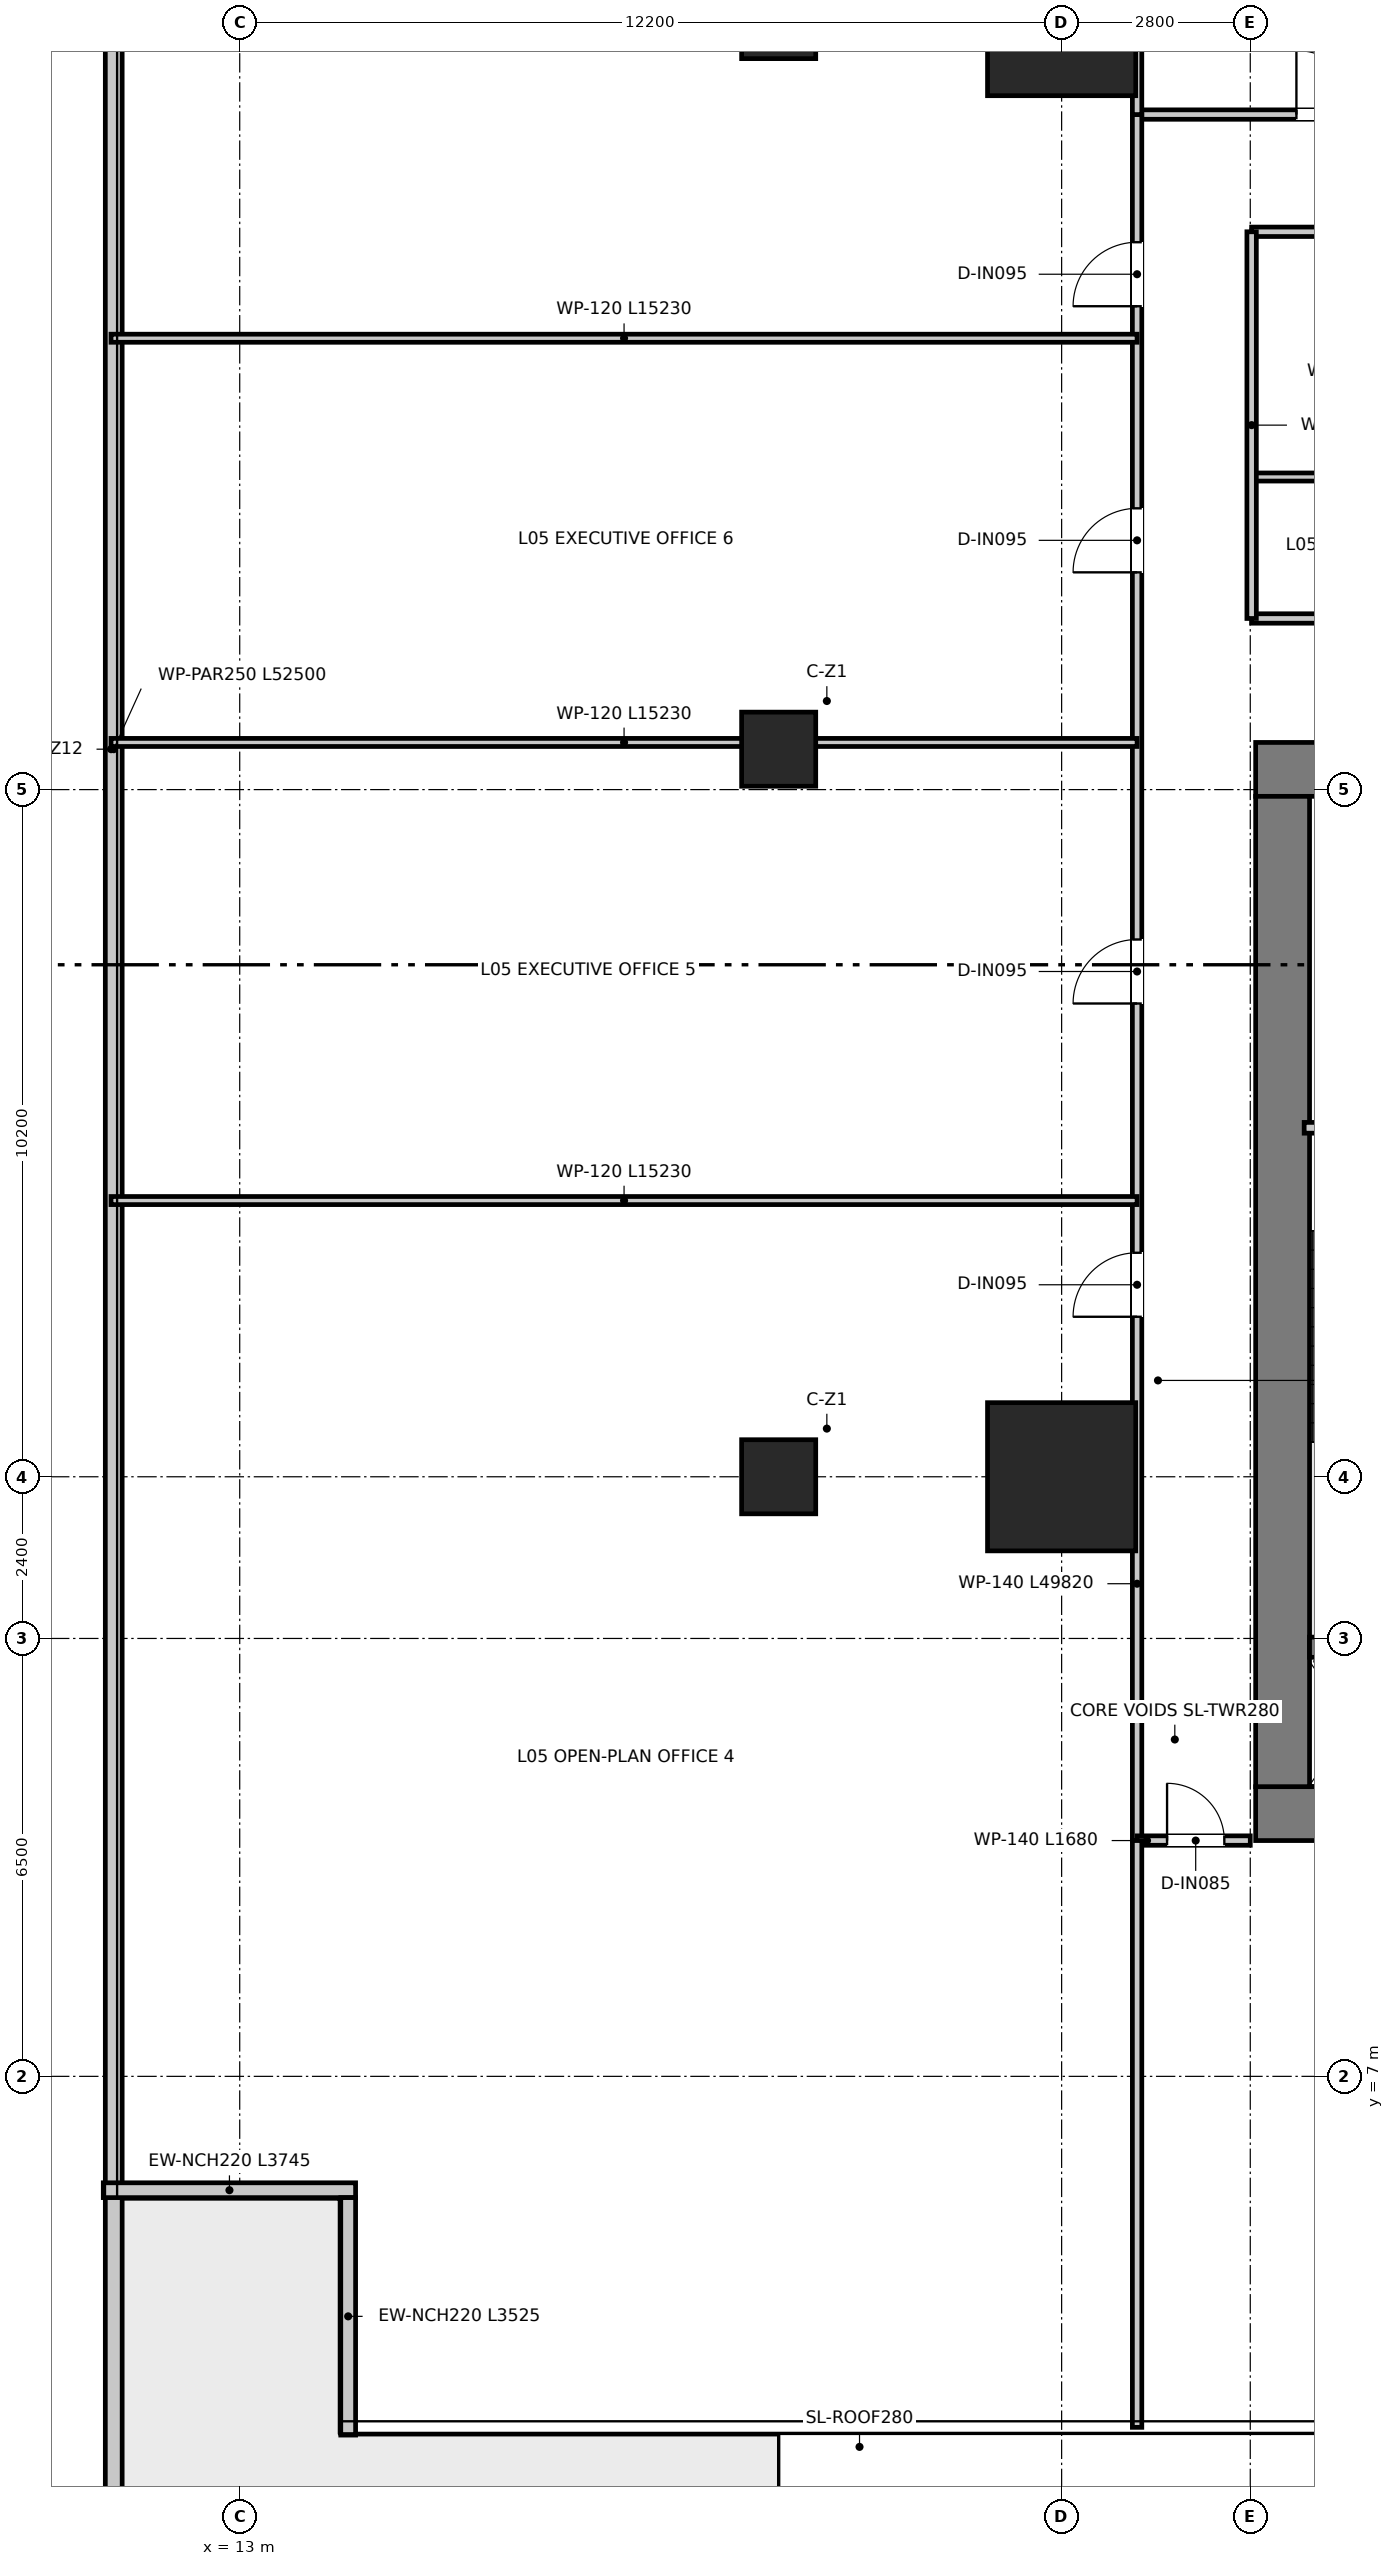
"""IFC4 building model, lengths in metres.
Left out: names, types, materials, properties, quantities, classifications, styles, units other than length and angle.
Written with IfcOpenShell. Run it as: python <this file> out.ifc"""

import sys

from ifc_helpers import new_model, si_unit, direction, frame, frame_2d, origin, origin_2d, place, context, subcontext, project, spatial, rectangle, extrude, source, transform, mapped, element, fill, save


model = new_model("IFC4")
c1 = context("Model", 3, precision=1e-05, world=origin(), true_north=direction((0.0, 1.0)))
c2 = subcontext(c1, "Body", "Model", "MODEL_VIEW")
j1 = project(units=[si_unit("LENGTHUNIT", "METRE"), si_unit("PLANEANGLEUNIT", "RADIAN")], contexts=[c1])
p1 = place(None, origin())
s1 = spatial("IfcSite", under=j1, at=p1, CompositionType="ELEMENT")
p2 = place(p1, origin())
s2 = spatial("IfcBuilding", under=s1, at=p2, CompositionType="ELEMENT")
p3 = place(p2, frame((0.0, 0.0, 25.0)))
s3 = spatial("IfcBuildingStorey", under=s2, at=p3, CompositionType="ELEMENT", Elevation=25.0)
p4 = place(p3, frame((28.08, 10.9, 0.0), z_axis=(0.0, 0.0, 1.0), x_axis=(1.0, 0.0, 0.0)))
e1 = element("IfcWall", 1, at=p4, inside=s3, PredefinedType="SHEAR", context=c2, shape_type="SweptSolid", body=[
    extrude(rectangle(XDim=15.84, YDim=0.8, at=frame_2d((7.92, 0.0))), origin(), (0.0, 0.0, 1.0), 3.95),
])
p5 = place(p3, frame((28.08, 26.4, 0.0), z_axis=(0.0, 0.0, 1.0), x_axis=(1.0, 0.0, 0.0)))
e2 = element("IfcWall", 2, at=p5, inside=s3, PredefinedType="SHEAR", context=c2, shape_type="SweptSolid", body=[
    extrude(rectangle(XDim=15.84, YDim=0.8, at=frame_2d((7.92, 0.0))), origin(), (0.0, 0.0, 1.0), 3.95),
])
p6 = place(p5, frame((7.22, 0.0, 0.0)))
e3 = element("IfcOpeningElement", 3, at=p6, cuts=e2, PredefinedType="OPENING", context=c2, shape_type="SweptSolid", body=[
    extrude(rectangle(XDim=1.4, YDim=2.2, at=frame_2d((0.7, 1.1))), frame((0.0, 0.41, 0.0), z_axis=(0.0, -1.0, 0.0), x_axis=(1.0, 0.0, 0.0)), (0.0, 0.0, 1.0), 0.82),
])
p7 = place(p5, frame((1.775, 0.0, 0.0)))
e4 = element("IfcOpeningElement", 4, at=p7, cuts=e2, PredefinedType="OPENING", context=c2, shape_type="SweptSolid", body=[
    extrude(rectangle(XDim=1.05, YDim=2.1, at=frame_2d((0.525, 1.05))), frame((0.0, 0.41, 0.0), z_axis=(0.0, -1.0, 0.0), x_axis=(1.0, 0.0, 0.0)), (0.0, 0.0, 1.0), 0.82),
])
p8 = place(p5, frame((13.015, 0.0, 0.0)))
e5 = element("IfcOpeningElement", 5, at=p8, cuts=e2, PredefinedType="OPENING", context=c2, shape_type="SweptSolid", body=[
    extrude(rectangle(XDim=1.05, YDim=2.1, at=frame_2d((0.525, 1.05))), frame((0.0, 0.41, 0.0), z_axis=(0.0, -1.0, 0.0), x_axis=(1.0, 0.0, 0.0)), (0.0, 0.0, 1.0), 0.82),
])
p9 = place(p3, frame((28.48, 11.3, 0.0), z_axis=(0.0, 0.0, 1.0), x_axis=(0.0, 1.0, 0.0)))
e6 = element("IfcWall", 6, at=p9, inside=s3, PredefinedType="SHEAR", context=c2, shape_type="SweptSolid", body=[
    extrude(rectangle(XDim=14.7, YDim=0.8, at=frame_2d((7.35, 0.0))), origin(), (0.0, 0.0, 1.0), 3.95),
])
p10 = place(p3, frame((28.88, 13.37, 0.0), z_axis=(0.0, 0.0, 1.0), x_axis=(1.0, 0.0, 0.0)))
e7 = element("IfcWall", 7, at=p10, inside=s3, PredefinedType="SHEAR", context=c2, shape_type="SweptSolid", body=[
    extrude(rectangle(XDim=3.1, YDim=0.3, at=frame_2d((1.55, 0.0))), origin(), (0.0, 0.0, 1.0), 3.95),
])
m1 = source(origin(), c2, "Body", "SweptSolid", [
    extrude(rectangle(XDim=2.2, YDim=2.2, at=origin_2d()), origin(), (0.0, 0.0, 1.0), 3.95),
])
for number, where, z_axis, x_axis in (
    (8, (25.2, 15.9, 0.0), (0.0, 0.0, 1.0), (1.0, 0.0, 0.0)),
    (9, (25.2, 37.5, 0.0), (0.0, 0.0, 1.0), (1.0, 0.0, 0.0)),
):
    element("IfcColumn", number, at=place(p3, frame(where, z_axis=z_axis, x_axis=x_axis)), inside=s3, PredefinedType="USERDEFINED", context=c2, shape_type="MappedRepresentation", body=[
        mapped(m1, transform((0.0, 0.0, 0.0), x_axis=(1.0, 0.0, 0.0), y_axis=(0.0, 1.0, 0.0), z_axis=(0.0, 0.0, 1.0), scale=1.0)),
    ])
m2 = source(origin(), c2, "Body", "SweptSolid", [
    extrude(rectangle(XDim=1.1, YDim=1.1, at=origin_2d()), origin(), (0.0, 0.0, 1.0), 3.95),
])
for number, where, z_axis, x_axis in (
    (10, (21.0, 15.9, 0.0), (0.0, 0.0, 1.0), (1.0, 0.0, 0.0)),
    (11, (21.0, 26.7, 0.0), (0.0, 0.0, 1.0), (1.0, 0.0, 0.0)),
    (12, (21.0, 37.5, 0.0), (0.0, 0.0, 1.0), (1.0, 0.0, 0.0)),
):
    element("IfcColumn", number, at=place(p3, frame(where, z_axis=z_axis, x_axis=x_axis)), inside=s3, PredefinedType="COLUMN", context=c2, shape_type="MappedRepresentation", body=[
        mapped(m2, transform((0.0, 0.0, 0.0), x_axis=(1.0, 0.0, 0.0), y_axis=(0.0, 1.0, 0.0), z_axis=(0.0, 0.0, 1.0), scale=1.0)),
    ])
p11 = place(p3, frame((11.13, 0.45, 0.0), z_axis=(0.0, 0.0, 1.0), x_axis=(0.0, 1.0, 0.0)))
e13 = element("IfcWall", 13, at=p11, inside=s3, PredefinedType="PARAPET", context=c2, shape_type="SweptSolid", body=[
    extrude(rectangle(XDim=52.5, YDim=0.25, at=frame_2d((26.25, 0.0))), origin(), (0.0, 0.0, 1.0), 1.2),
])
p12 = place(p3, frame((10.975, 5.31, 0.0), z_axis=(0.0, 0.0, 1.0), x_axis=(1.0, 0.0, 0.0)))
e14 = element("IfcWall", 14, at=p12, inside=s3, PredefinedType="ELEMENTEDWALL", context=c2, shape_type="SweptSolid", body=[
    extrude(rectangle(XDim=3.745, YDim=0.22, at=frame_2d((1.873, 0.0))), origin(), (0.0, 0.0, 1.0), 3.67),
])
p13 = place(p3, frame((14.61, 5.2, 0.0), z_axis=(0.0, 0.0, 1.0), x_axis=(0.0, -1.0, 0.0)))
e15 = element("IfcWall", 15, at=p13, inside=s3, PredefinedType="ELEMENTEDWALL", context=c2, shape_type="SweptSolid", body=[
    extrude(rectangle(XDim=3.525, YDim=0.22, at=frame_2d((1.762, 0.0))), origin(), (0.0, 0.0, 1.0), 3.67),
])
p14 = place(p3, frame((28.8, 21.08, 0.0), z_axis=(0.0, 0.0, 1.0), x_axis=(1.0, 0.0, 0.0)))
e16 = element("IfcWall", 16, at=p14, inside=s3, PredefinedType="PARTITIONING", context=c2, shape_type="SweptSolid", body=[
    extrude(rectangle(XDim=3.16, YDim=0.16, at=frame_2d((1.58, 0.0))), origin(), (0.0, 0.0, 1.0), 3.67),
])
p15 = place(p14, frame((1.055, 0.0, 0.0)))
e17 = element("IfcOpeningElement", 17, at=p15, cuts=e16, PredefinedType="OPENING", context=c2, shape_type="SweptSolid", body=[
    extrude(rectangle(XDim=1.05, YDim=2.1, at=frame_2d((0.525, 1.05))), frame((0.0, 0.09, 0.0), z_axis=(0.0, -1.0, 0.0), x_axis=(1.0, 0.0, 0.0)), (0.0, 0.0, 1.0), 0.18),
])
p16 = place(p3, frame((28.02, 28.64, 0.0), z_axis=(0.0, 0.0, 1.0), x_axis=(1.0, 0.0, 0.0)))
e18 = element("IfcWall", 18, at=p16, inside=s3, PredefinedType="PARTITIONING", context=c2, shape_type="SweptSolid", body=[
    extrude(rectangle(XDim=15.96, YDim=0.14, at=frame_2d((7.98, 0.0))), origin(), (0.0, 0.0, 1.0), 3.08),
])
p17 = place(p16, frame((7.455, 0.0, 0.0)))
e19 = element("IfcOpeningElement", 19, at=p17, cuts=e18, PredefinedType="OPENING", context=c2, shape_type="SweptSolid", body=[
    extrude(rectangle(XDim=1.05, YDim=2.15, at=frame_2d((0.525, 1.075))), frame((0.0, 0.08, 0.0), z_axis=(0.0, -1.0, 0.0), x_axis=(1.0, 0.0, 0.0)), (0.0, 0.0, 1.0), 0.16),
])
p18 = place(p3, frame((28.02, 30.74, 0.0), z_axis=(0.0, 0.0, 1.0), x_axis=(1.0, 0.0, 0.0)))
e20 = element("IfcWall", 20, at=p18, inside=s3, PredefinedType="PARTITIONING", context=c2, shape_type="SweptSolid", body=[
    extrude(rectangle(XDim=15.96, YDim=0.12, at=frame_2d((7.98, 0.0))), origin(), (0.0, 0.0, 1.0), 3.08),
])
p19 = place(p3, frame((28.02, 34.38, 0.0), z_axis=(0.0, 0.0, 1.0), x_axis=(1.0, 0.0, 0.0)))
e21 = element("IfcWall", 21, at=p19, inside=s3, PredefinedType="PARTITIONING", context=c2, shape_type="SweptSolid", body=[
    extrude(rectangle(XDim=15.96, YDim=0.14, at=frame_2d((7.98, 0.0))), origin(), (0.0, 0.0, 1.0), 3.08),
])
p20 = place(p19, frame((1.13, 0.0, 0.0)))
e22 = element("IfcOpeningElement", 22, at=p20, cuts=e21, PredefinedType="OPENING", context=c2, shape_type="SweptSolid", body=[
    extrude(rectangle(XDim=0.9, YDim=2.1, at=frame_2d((0.45, 1.05))), frame((0.0, 0.08, 0.0), z_axis=(0.0, -1.0, 0.0), x_axis=(1.0, 0.0, 0.0)), (0.0, 0.0, 1.0), 0.16),
])
p21 = place(p19, frame((4.33, 0.0, 0.0)))
e23 = element("IfcOpeningElement", 23, at=p21, cuts=e21, PredefinedType="OPENING", context=c2, shape_type="SweptSolid", body=[
    extrude(rectangle(XDim=0.9, YDim=2.1, at=frame_2d((0.45, 1.05))), frame((0.0, 0.08, 0.0), z_axis=(0.0, -1.0, 0.0), x_axis=(1.0, 0.0, 0.0)), (0.0, 0.0, 1.0), 0.16),
])
p22 = place(p19, frame((7.355, 0.0, 0.0)))
e24 = element("IfcOpeningElement", 24, at=p22, cuts=e21, PredefinedType="OPENING", context=c2, shape_type="SweptSolid", body=[
    extrude(rectangle(XDim=0.95, YDim=2.1, at=frame_2d((0.475, 1.05))), frame((0.0, 0.08, 0.0), z_axis=(0.0, -1.0, 0.0), x_axis=(1.0, 0.0, 0.0)), (0.0, 0.0, 1.0), 0.16),
])
p23 = place(p19, frame((12.23, 0.0, 0.0)))
e25 = element("IfcOpeningElement", 25, at=p23, cuts=e21, PredefinedType="OPENING", context=c2, shape_type="SweptSolid", body=[
    extrude(rectangle(XDim=0.95, YDim=2.1, at=frame_2d((0.475, 1.05))), frame((0.0, 0.08, 0.0), z_axis=(0.0, -1.0, 0.0), x_axis=(1.0, 0.0, 0.0)), (0.0, 0.0, 1.0), 0.16),
])
p24 = place(p3, frame((28.02, 28.64, 0.0), z_axis=(0.0, 0.0, 1.0), x_axis=(0.0, 1.0, 0.0)))
e26 = element("IfcWall", 26, at=p24, inside=s3, PredefinedType="PARTITIONING", context=c2, shape_type="SweptSolid", body=[
    extrude(rectangle(XDim=5.74, YDim=0.14, at=frame_2d((2.87, 0.0))), origin(), (0.0, 0.0, 1.0), 3.22),
])
p25 = place(p3, frame((26.32, 36.12, 0.0), z_axis=(0.0, 0.0, 1.0), x_axis=(1.0, 0.0, 0.0)))
e27 = element("IfcWall", 27, at=p25, inside=s3, PredefinedType="PARTITIONING", context=c2, shape_type="SweptSolid", body=[
    extrude(rectangle(XDim=19.36, YDim=0.14, at=frame_2d((9.68, 0.0))), origin(), (0.0, 0.0, 1.0), 3.08),
])
p26 = place(p25, frame((2.365, 0.0, 0.0)))
e28 = element("IfcOpeningElement", 28, at=p26, cuts=e27, PredefinedType="OPENING", context=c2, shape_type="SweptSolid", body=[
    extrude(rectangle(XDim=0.95, YDim=2.1, at=frame_2d((0.475, 1.05))), frame((0.0, 0.08, 0.0), z_axis=(0.0, -1.0, 0.0), x_axis=(1.0, 0.0, 0.0)), (0.0, 0.0, 1.0), 0.16),
])
p27 = place(p25, frame((9.205, 0.0, 0.0)))
e29 = element("IfcOpeningElement", 29, at=p27, cuts=e27, PredefinedType="OPENING", context=c2, shape_type="SweptSolid", body=[
    extrude(rectangle(XDim=0.95, YDim=2.1, at=frame_2d((0.475, 1.05))), frame((0.0, 0.08, 0.0), z_axis=(0.0, -1.0, 0.0), x_axis=(1.0, 0.0, 0.0)), (0.0, 0.0, 1.0), 0.16),
])
p28 = place(p25, frame((16.045, 0.0, 0.0)))
e30 = element("IfcOpeningElement", 30, at=p28, cuts=e27, PredefinedType="OPENING", context=c2, shape_type="SweptSolid", body=[
    extrude(rectangle(XDim=0.95, YDim=2.1, at=frame_2d((0.475, 1.05))), frame((0.0, 0.08, 0.0), z_axis=(0.0, -1.0, 0.0), x_axis=(1.0, 0.0, 0.0)), (0.0, 0.0, 1.0), 0.16),
])
p29 = place(p3, frame((26.32, 10.5, 0.0), z_axis=(0.0, 0.0, 1.0), x_axis=(0.0, 1.0, 0.0)))
e31 = element("IfcWall", 31, at=p29, inside=s3, PredefinedType="PARTITIONING", context=c2, shape_type="SweptSolid", body=[
    extrude(rectangle(XDim=25.62, YDim=0.14, at=frame_2d((12.81, 0.0))), origin(), (0.0, 0.0, 1.0), 2.97),
])
p30 = place(p29, frame((7.775, 0.0, 0.0)))
e32 = element("IfcOpeningElement", 32, at=p30, cuts=e31, PredefinedType="OPENING", context=c2, shape_type="SweptSolid", body=[
    extrude(rectangle(XDim=0.95, YDim=2.1, at=frame_2d((0.475, 1.05))), frame((0.0, 0.08, 0.0), z_axis=(0.0, -1.0, 0.0), x_axis=(1.0, 0.0, 0.0)), (0.0, 0.0, 1.0), 0.16),
])
p31 = place(p29, frame((12.425, 0.0, 0.0)))
e33 = element("IfcOpeningElement", 33, at=p31, cuts=e31, PredefinedType="OPENING", context=c2, shape_type="SweptSolid", body=[
    extrude(rectangle(XDim=0.95, YDim=2.1, at=frame_2d((0.475, 1.05))), frame((0.0, 0.08, 0.0), z_axis=(0.0, -1.0, 0.0), x_axis=(1.0, 0.0, 0.0)), (0.0, 0.0, 1.0), 0.16),
])
p32 = place(p29, frame((18.825, 0.0, 0.0)))
e34 = element("IfcOpeningElement", 34, at=p32, cuts=e31, PredefinedType="OPENING", context=c2, shape_type="SweptSolid", body=[
    extrude(rectangle(XDim=0.95, YDim=2.1, at=frame_2d((0.475, 1.05))), frame((0.0, 0.08, 0.0), z_axis=(0.0, -1.0, 0.0), x_axis=(1.0, 0.0, 0.0)), (0.0, 0.0, 1.0), 0.16),
])
p33 = place(p29, frame((22.775, 0.0, 0.0)))
e35 = element("IfcOpeningElement", 35, at=p33, cuts=e31, PredefinedType="OPENING", context=c2, shape_type="SweptSolid", body=[
    extrude(rectangle(XDim=0.95, YDim=2.1, at=frame_2d((0.475, 1.05))), frame((0.0, 0.08, 0.0), z_axis=(0.0, -1.0, 0.0), x_axis=(1.0, 0.0, 0.0)), (0.0, 0.0, 1.0), 0.16),
])
p34 = place(p3, frame((26.32, 10.5, 0.0), z_axis=(0.0, 0.0, 1.0), x_axis=(1.0, 0.0, 0.0)))
e36 = element("IfcWall", 36, at=p34, inside=s3, PredefinedType="PARTITIONING", context=c2, shape_type="SweptSolid", body=[
    extrude(rectangle(XDim=1.68, YDim=0.14, at=frame_2d((0.84, 0.0))), origin(), (0.0, 0.0, 1.0), 3.67),
])
p35 = place(p34, frame((0.445, 0.0, 0.0)))
e37 = element("IfcOpeningElement", 37, at=p35, cuts=e36, PredefinedType="OPENING", context=c2, shape_type="SweptSolid", body=[
    extrude(rectangle(XDim=0.85, YDim=2.1, at=frame_2d((0.425, 1.05))), frame((0.0, 0.08, 0.0), z_axis=(0.0, -1.0, 0.0), x_axis=(1.0, 0.0, 0.0)), (0.0, 0.0, 1.0), 0.16),
])
p36 = place(p3, frame((26.32, 36.12, 0.0), z_axis=(0.0, 0.0, 1.0), x_axis=(0.0, 1.0, 0.0)))
e38 = element("IfcWall", 38, at=p36, inside=s3, PredefinedType="PARTITIONING", context=c2, shape_type="SweptSolid", body=[
    extrude(rectangle(XDim=15.49, YDim=0.14, at=frame_2d((7.745, 0.0))), origin(), (0.0, 0.0, 1.0), 2.97),
])
p37 = place(p3, frame((26.32, 1.79, 0.0), z_axis=(0.0, 0.0, 1.0), x_axis=(0.0, 1.0, 0.0)))
e39 = element("IfcWall", 39, at=p37, inside=s3, PredefinedType="PARTITIONING", context=c2, shape_type="SweptSolid", body=[
    extrude(rectangle(XDim=8.71, YDim=0.14, at=frame_2d((4.355, 0.0))), origin(), (0.0, 0.0, 1.0), 3.67),
])
for number, where, z_axis, x_axis in (
    (40, (11.09, 20.0, 0.0), (0.0, 0.0, 1.0), (1.0, 0.0, 0.0)),
    (41, (11.09, 26.8, 0.0), (0.0, 0.0, 1.0), (1.0, 0.0, 0.0)),
    (42, (11.09, 32.8, 0.0), (0.0, 0.0, 1.0), (1.0, 0.0, 0.0)),
):
    element("IfcWall", number, at=place(p3, frame(where, z_axis=z_axis, x_axis=x_axis)), inside=s3, PredefinedType="PARTITIONING", context=c2, shape_type="SweptSolid", body=[
        extrude(rectangle(XDim=15.23, YDim=0.12, at=frame_2d((7.615, 0.0))), origin(), (0.0, 0.0, 1.0), 2.97),
    ])
p38 = place(p26, origin())
e43 = element("IfcDoor", 43, at=p38, inside=s3, OperationType="SINGLE_SWING_LEFT", PredefinedType="DOOR", context=c2, shape_type="SweptSolid", body=[
    extrude(rectangle(XDim=0.95, YDim=2.1, at=frame_2d((0.475, 1.05))), frame((0.0, 0.025, 0.0), z_axis=(0.0, -1.0, 0.0), x_axis=(1.0, 0.0, 0.0)), (0.0, 0.0, 1.0), 0.05),
])
fill(e28, e43)
p39 = place(p30, origin())
e44 = element("IfcDoor", 44, at=p39, inside=s3, OperationType="SINGLE_SWING_LEFT", PredefinedType="DOOR", context=c2, shape_type="SweptSolid", body=[
    extrude(rectangle(XDim=0.95, YDim=2.1, at=frame_2d((0.475, 1.05))), frame((0.0, 0.025, 0.0), z_axis=(0.0, -1.0, 0.0), x_axis=(1.0, 0.0, 0.0)), (0.0, 0.0, 1.0), 0.05),
])
fill(e32, e44)
p40 = place(p31, origin())
e45 = element("IfcDoor", 45, at=p40, inside=s3, OperationType="SINGLE_SWING_LEFT", PredefinedType="DOOR", context=c2, shape_type="SweptSolid", body=[
    extrude(rectangle(XDim=0.95, YDim=2.1, at=frame_2d((0.475, 1.05))), frame((0.0, 0.025, 0.0), z_axis=(0.0, -1.0, 0.0), x_axis=(1.0, 0.0, 0.0)), (0.0, 0.0, 1.0), 0.05),
])
fill(e33, e45)
p41 = place(p32, origin())
e46 = element("IfcDoor", 46, at=p41, inside=s3, OperationType="SINGLE_SWING_LEFT", PredefinedType="DOOR", context=c2, shape_type="SweptSolid", body=[
    extrude(rectangle(XDim=0.95, YDim=2.1, at=frame_2d((0.475, 1.05))), frame((0.0, 0.025, 0.0), z_axis=(0.0, -1.0, 0.0), x_axis=(1.0, 0.0, 0.0)), (0.0, 0.0, 1.0), 0.05),
])
fill(e34, e46)
p42 = place(p33, origin())
e47 = element("IfcDoor", 47, at=p42, inside=s3, OperationType="SINGLE_SWING_LEFT", PredefinedType="DOOR", context=c2, shape_type="SweptSolid", body=[
    extrude(rectangle(XDim=0.95, YDim=2.1, at=frame_2d((0.475, 1.05))), frame((0.0, 0.025, 0.0), z_axis=(0.0, -1.0, 0.0), x_axis=(1.0, 0.0, 0.0)), (0.0, 0.0, 1.0), 0.05),
])
fill(e35, e47)
p43 = place(p35, origin())
e48 = element("IfcDoor", 48, at=p43, inside=s3, OperationType="SINGLE_SWING_LEFT", PredefinedType="DOOR", context=c2, shape_type="SweptSolid", body=[
    extrude(rectangle(XDim=0.85, YDim=2.1, at=frame_2d((0.425, 1.05))), frame((0.0, 0.025, 0.0), z_axis=(0.0, -1.0, 0.0), x_axis=(1.0, 0.0, 0.0)), (0.0, 0.0, 1.0), 0.05),
])
fill(e37, e48)
save(model, sys.argv[1])
